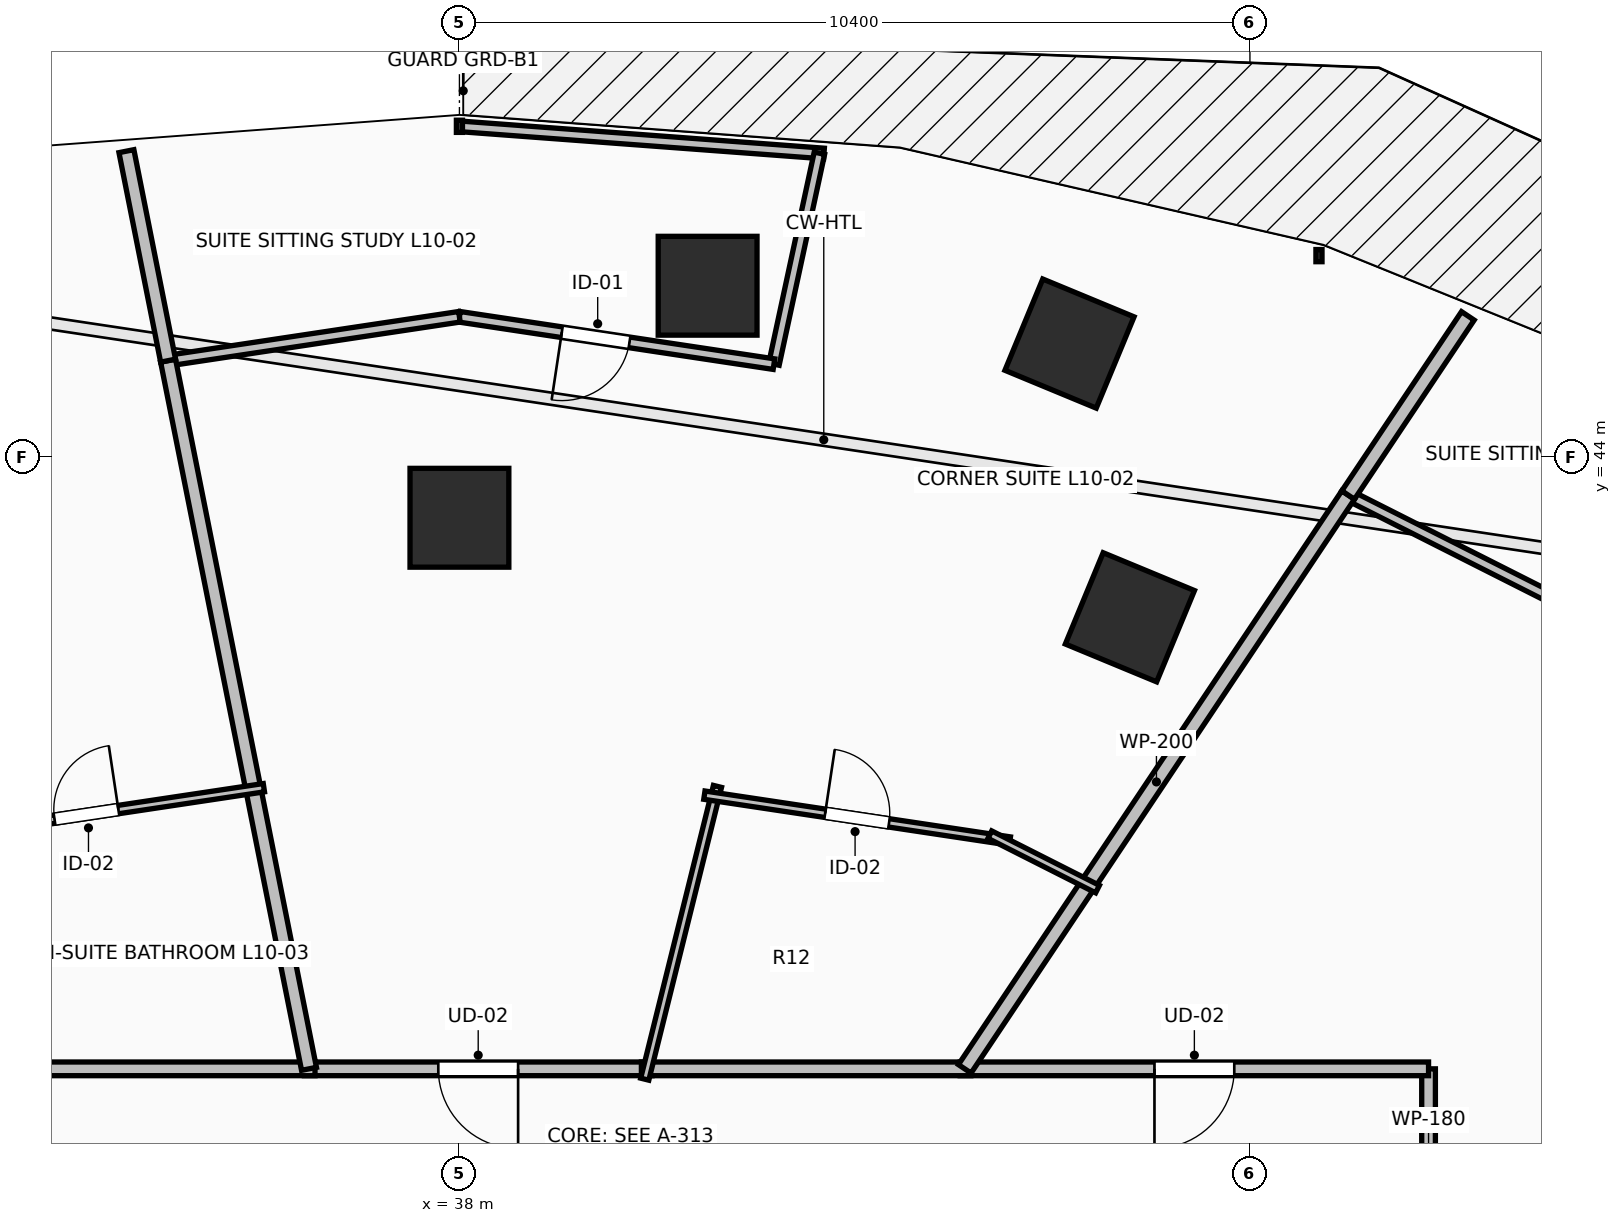
"""IFC4 building model, lengths in metres.
Left out: names, types, materials, properties, quantities, classifications, styles, units other than length and angle.
Written with IfcOpenShell. Run it as: python <this file> out.ifc"""

import sys

from ifc_helpers import new_model, si_unit, direction, frame, frame_2d, origin, origin_2d, place, context, subcontext, project, spatial, rectangle, extrude, element, fill, save


model = new_model("IFC4")
c1 = context("Model", 3, precision=1e-05, world=origin(), true_north=direction((0.0, 1.0)))
c2 = subcontext(c1, "Body", "Model", "MODEL_VIEW")
j1 = project(units=[si_unit("LENGTHUNIT", "METRE"), si_unit("PLANEANGLEUNIT", "RADIAN")], contexts=[c1])
p1 = place(None, origin())
s1 = spatial("IfcSite", under=j1, at=p1, CompositionType="ELEMENT")
p2 = place(p1, origin())
s2 = spatial("IfcBuilding", under=s1, at=p2, CompositionType="ELEMENT")
p3 = place(p2, frame((0.0, 0.0, 41.5)))
s3 = spatial("IfcBuildingStorey", under=s2, at=p3, CompositionType="ELEMENT", Elevation=41.5)
for number, where, z_axis, x_axis in (
    (1, (46.821, 41.891, 0.0), (0.0, 0.0, 1.0), (0.383, 0.924, 0.0)),
    (2, (38.0, 43.2, 0.0), (0.0, 0.0, 1.0), (0.0, 1.0, 0.0)),
    (3, (46.026, 45.492, 0.0), (0.0, 0.0, 1.0), (0.383, 0.924, 0.0)),
    (4, (41.265, 46.252, 0.0), (0.0, 0.0, 1.0), (0.0, 1.0, 0.0)),
):
    element("IfcColumn", number, at=place(p3, frame(where, z_axis=z_axis, x_axis=x_axis)), inside=s3, PredefinedType="COLUMN", context=c2, shape_type="SweptSolid", body=[
        extrude(rectangle(XDim=1.3, YDim=1.3, at=origin_2d()), origin(), (0.0, 0.0, 1.0), 3.5),
    ])
p4 = place(p3, frame((50.75, 33.616, 0.0), z_axis=(0.0, 0.0, 1.0), x_axis=(0.0, 1.0, 0.0)))
e5 = element("IfcWall", 5, at=p4, inside=s3, PredefinedType="PARTITIONING", context=c2, shape_type="SweptSolid", body=[
    extrude(rectangle(XDim=2.334, YDim=0.18, at=frame_2d((1.167, 0.0))), origin(), (0.0, 0.0, 1.0), 2.432),
])
p5 = place(p3, frame((50.75, 35.95, 0.0), z_axis=(0.0, 0.0, 1.0), x_axis=(-1.0, 0.0, 0.0)))
e6 = element("IfcWall", 6, at=p5, inside=s3, PredefinedType="PARTITIONING", context=c2, shape_type="SweptSolid", body=[
    extrude(rectangle(XDim=6.162, YDim=0.18, at=frame_2d((3.081, 0.0))), origin(), (0.0, 0.0, 1.0), 2.432),
])
p6 = place(p5, frame((2.556, 0.0, 0.0)))
e7 = element("IfcOpeningElement", 7, at=p6, cuts=e6, PredefinedType="OPENING", context=c2, shape_type="SweptSolid", body=[
    extrude(rectangle(XDim=1.05, YDim=2.2, at=frame_2d((0.525, 1.1))), frame((0.0, 0.105, 0.0), z_axis=(0.0, -1.0, 0.0), x_axis=(1.0, 0.0, 0.0)), (0.0, 0.0, 1.0), 0.21),
])
p7 = place(p3, frame((40.534, 35.95, 0.0), z_axis=(0.0, 0.0, 1.0), x_axis=(-1.0, 0.0, 0.0)))
e8 = element("IfcWall", 8, at=p7, inside=s3, PredefinedType="PARTITIONING", context=c2, shape_type="SweptSolid", body=[
    extrude(rectangle(XDim=4.574, YDim=0.18, at=frame_2d((2.287, 0.0))), origin(), (0.0, 0.0, 1.0), 3.24),
])
p8 = place(p7, frame((1.762, 0.0, 0.0)))
e9 = element("IfcOpeningElement", 9, at=p8, cuts=e8, PredefinedType="OPENING", context=c2, shape_type="SweptSolid", body=[
    extrude(rectangle(XDim=1.05, YDim=2.2, at=frame_2d((0.525, 1.1))), frame((0.0, 0.105, 0.0), z_axis=(0.0, -1.0, 0.0), x_axis=(1.0, 0.0, 0.0)), (0.0, 0.0, 1.0), 0.21),
])
p9 = place(p3, frame((44.728, 35.95, 0.0), z_axis=(0.0, 0.0, 1.0), x_axis=(-1.0, 0.0, 0.0)))
e10 = element("IfcWall", 10, at=p9, inside=s3, PredefinedType="PARTITIONING", context=c2, shape_type="SweptSolid", body=[
    extrude(rectangle(XDim=4.334, YDim=0.18, at=frame_2d((2.167, 0.0))), origin(), (0.0, 0.0, 1.0), 3.24),
])
p10 = place(p3, frame((36.1, 35.95, 0.0), z_axis=(0.0, 0.0, 1.0), x_axis=(-1.0, 0.0, 0.0)))
e11 = element("IfcWall", 11, at=p10, inside=s3, PredefinedType="PARTITIONING", context=c2, shape_type="SweptSolid", body=[
    extrude(rectangle(XDim=4.17, YDim=0.18, at=frame_2d((2.085, 0.0))), origin(), (0.0, 0.0, 1.0), 3.24),
])
p11 = place(p3, frame((56.554, 40.032, 0.0), z_axis=(0.0, 0.0, 1.0), x_axis=(-0.892545780062, 0.450956794487, 0.0)))
e12 = element("IfcWall", 12, at=p11, inside=s3, PredefinedType="PARTITIONING", context=c2, shape_type="SweptSolid", body=[
    extrude(rectangle(XDim=7.688, YDim=0.14, at=frame_2d((3.844, 0.0))), origin(), (0.0, 0.0, 1.0), 2.432),
])
p12 = place(p11, frame((3.394, 0.0, 0.0)))
e13 = element("IfcOpeningElement", 13, at=p12, cuts=e12, PredefinedType="OPENING", context=c2, shape_type="SweptSolid", body=[
    extrude(rectangle(XDim=0.9, YDim=2.1, at=frame_2d((0.45, 1.05))), frame((0.0, 0.085, 0.0), z_axis=(0.0, -1.0, 0.0), x_axis=(1.0, 0.0, 0.0)), (0.0, 0.0, 1.0), 0.17),
])
p13 = place(p3, frame((49.692, 43.499, 0.0), z_axis=(0.0, 0.0, 1.0), x_axis=(-0.555556259167, -0.831478949163, 0.0)))
e14 = element("IfcWall", 14, at=p13, inside=s3, PredefinedType="PARTITIONING", context=c2, shape_type="SweptSolid", body=[
    extrude(rectangle(XDim=9.079, YDim=0.2, at=frame_2d((4.54, 0.0))), origin(), (0.0, 0.0, 1.0), 2.432),
])
p14 = place(p3, frame((51.267, 45.856, 0.0), z_axis=(0.0, 0.0, 1.0), x_axis=(-0.555653789226, -0.831413775757, 0.0)))
e15 = element("IfcWall", 15, at=p14, inside=s3, PredefinedType="PARTITIONING", context=c2, shape_type="SweptSolid", body=[
    extrude(rectangle(XDim=2.835, YDim=0.2, at=frame_2d((1.417, 0.0))), origin(), (0.0, 0.0, 1.0), 2.624),
])
p15 = place(p3, frame((40.438, 35.814, 0.0), z_axis=(0.0, 0.0, 1.0), x_axis=(0.24101554649, 0.970521254971, 0.0)))
e16 = element("IfcWall", 16, at=p15, inside=s3, PredefinedType="PARTITIONING", context=c2, shape_type="SweptSolid", body=[
    extrude(rectangle(XDim=3.969, YDim=0.11, at=frame_2d((1.984, 0.0))), origin(), (0.0, 0.0, 1.0), 2.972),
])
p16 = place(p3, frame((41.223, 39.551, 0.0), z_axis=(0.0, 0.0, 1.0), x_axis=(0.988911221338, -0.148507899833, 0.0)))
e17 = element("IfcWall", 17, at=p16, inside=s3, PredefinedType="PARTITIONING", context=c2, shape_type="SweptSolid", body=[
    extrude(rectangle(XDim=4.064, YDim=0.11, at=frame_2d((2.032, 0.0))), origin(), (0.0, 0.0, 1.0), 3.24),
])
p17 = place(p16, frame((1.607, 0.0, 0.0)))
e18 = element("IfcOpeningElement", 18, at=p17, cuts=e17, PredefinedType="OPENING", context=c2, shape_type="SweptSolid", body=[
    extrude(rectangle(XDim=0.85, YDim=2.1, at=frame_2d((0.425, 1.05))), frame((0.0, 0.07, 0.0), z_axis=(0.0, -1.0, 0.0), x_axis=(1.0, 0.0, 0.0)), (0.0, 0.0, 1.0), 0.14),
])
p18 = place(p3, frame((44.978, 39.031, 0.0), z_axis=(0.0, 0.0, 1.0), x_axis=(0.892388427115, -0.451268096758, 0.0)))
e19 = element("IfcWall", 19, at=p18, inside=s3, PredefinedType="PARTITIONING", context=c2, shape_type="SweptSolid", body=[
    extrude(rectangle(XDim=1.588, YDim=0.11, at=frame_2d((0.794, 0.0))), origin(), (0.0, 0.0, 1.0), 3.24),
])
p19 = place(p3, frame((42.796, 47.992, 0.0), z_axis=(0.0, 0.0, 1.0), x_axis=(-0.99722311136, 0.074471915311, 0.0)))
e20 = element("IfcWall", 20, at=p19, inside=s3, PredefinedType="PARTITIONING", context=c2, shape_type="SweptSolid", body=[
    extrude(rectangle(XDim=4.809, YDim=0.14, at=frame_2d((2.405, 0.0))), origin(), (0.0, 0.0, 1.0), 3.24),
])
p20 = place(p3, frame((42.736, 47.996, 0.0), z_axis=(0.0, 0.0, 1.0), x_axis=(-0.210697687201, -0.977551269555, 0.0)))
e21 = element("IfcWall", 21, at=p20, inside=s3, PredefinedType="PARTITIONING", context=c2, shape_type="SweptSolid", body=[
    extrude(rectangle(XDim=2.839, YDim=0.14, at=frame_2d((1.419, 0.0))), origin(), (0.0, 0.0, 1.0), 2.624),
])
p21 = place(p3, frame((42.138, 45.221, 0.0), z_axis=(0.0, 0.0, 1.0), x_axis=(-0.988853606593, 0.148891049857, 0.0)))
e22 = element("IfcWall", 22, at=p21, inside=s3, PredefinedType="PARTITIONING", context=c2, shape_type="SweptSolid", body=[
    extrude(rectangle(XDim=4.185, YDim=0.14, at=frame_2d((2.092, 0.0))), origin(), (0.0, 0.0, 1.0), 2.432),
])
p22 = place(p21, frame((1.922, 0.0, 0.0)))
e23 = element("IfcOpeningElement", 23, at=p22, cuts=e22, PredefinedType="OPENING", context=c2, shape_type="SweptSolid", body=[
    extrude(rectangle(XDim=0.9, YDim=2.1, at=frame_2d((0.45, 1.05))), frame((0.0, 0.085, 0.0), z_axis=(0.0, -1.0, 0.0), x_axis=(1.0, 0.0, 0.0)), (0.0, 0.0, 1.0), 0.17),
])
p23 = place(p3, frame((38.0, 45.844, 0.0), z_axis=(0.0, 0.0, 1.0), x_axis=(-0.988862311426, -0.148833225599, 0.0)))
e24 = element("IfcWall", 24, at=p23, inside=s3, PredefinedType="PARTITIONING", context=c2, shape_type="SweptSolid", body=[
    extrude(rectangle(XDim=3.876, YDim=0.14, at=frame_2d((1.938, 0.0))), origin(), (0.0, 0.0, 1.0), 2.624),
])
p24 = place(p3, frame((34.167, 45.267, 0.0), z_axis=(0.0, 0.0, 1.0), x_axis=(0.19516219459, -0.980770981322, 0.0)))
e25 = element("IfcWall", 25, at=p24, inside=s3, PredefinedType="PARTITIONING", context=c2, shape_type="SweptSolid", body=[
    extrude(rectangle(XDim=9.5, YDim=0.2, at=frame_2d((4.75, 0.0))), origin(), (0.0, 0.0, 1.0), 2.432),
])
p25 = place(p3, frame((33.619, 48.023, 0.0), z_axis=(0.0, 0.0, 1.0), x_axis=(0.195063341769, -0.980790646722, 0.0)))
e26 = element("IfcWall", 26, at=p25, inside=s3, PredefinedType="PARTITIONING", context=c2, shape_type="SweptSolid", body=[
    extrude(rectangle(XDim=2.81, YDim=0.2, at=frame_2d((1.405, 0.0))), origin(), (0.0, 0.0, 1.0), 2.624),
])
p26 = place(p3, frame((30.759, 38.947, 0.0), z_axis=(0.0, 0.0, 1.0), x_axis=(0.9889029502, 0.148562966739, 0.0)))
e27 = element("IfcWall", 27, at=p26, inside=s3, PredefinedType="PARTITIONING", context=c2, shape_type="SweptSolid", body=[
    extrude(rectangle(XDim=4.721, YDim=0.11, at=frame_2d((2.361, 0.0))), origin(), (0.0, 0.0, 1.0), 2.432),
])
p27 = place(p26, frame((1.936, 0.0, 0.0)))
e28 = element("IfcOpeningElement", 28, at=p27, cuts=e27, PredefinedType="OPENING", context=c2, shape_type="SweptSolid", body=[
    extrude(rectangle(XDim=0.85, YDim=2.1, at=frame_2d((0.425, 1.05))), frame((0.0, 0.07, 0.0), z_axis=(0.0, -1.0, 0.0), x_axis=(1.0, 0.0, 0.0)), (0.0, 0.0, 1.0), 0.14),
])
p28 = place(p6, origin())
e29 = element("IfcDoor", 29, at=p28, inside=s3, OperationType="SINGLE_SWING_RIGHT", PredefinedType="DOOR", context=c2, shape_type="SweptSolid", body=[
    extrude(rectangle(XDim=1.05, YDim=2.2, at=frame_2d((0.525, 1.1))), frame((0.0, 0.025, 0.0), z_axis=(0.0, -1.0, 0.0), x_axis=(1.0, 0.0, 0.0)), (0.0, 0.0, 1.0), 0.05),
])
fill(e7, e29)
p29 = place(p8, origin())
e30 = element("IfcDoor", 30, at=p29, inside=s3, OperationType="SINGLE_SWING_LEFT", PredefinedType="DOOR", context=c2, shape_type="SweptSolid", body=[
    extrude(rectangle(XDim=1.05, YDim=2.2, at=frame_2d((0.525, 1.1))), frame((0.0, 0.025, 0.0), z_axis=(0.0, -1.0, 0.0), x_axis=(1.0, 0.0, 0.0)), (0.0, 0.0, 1.0), 0.05),
])
fill(e9, e30)
p30 = place(p17, origin())
e31 = element("IfcDoor", 31, at=p30, inside=s3, OperationType="SINGLE_SWING_LEFT", PredefinedType="DOOR", context=c2, shape_type="SweptSolid", body=[
    extrude(rectangle(XDim=0.85, YDim=2.1, at=frame_2d((0.425, 1.05))), frame((0.0, 0.025, 0.0), z_axis=(0.0, -1.0, 0.0), x_axis=(1.0, 0.0, 0.0)), (0.0, 0.0, 1.0), 0.05),
])
fill(e18, e31)
p31 = place(p22, origin())
e32 = element("IfcDoor", 32, at=p31, inside=s3, OperationType="SINGLE_SWING_RIGHT", PredefinedType="DOOR", context=c2, shape_type="SweptSolid", body=[
    extrude(rectangle(XDim=0.9, YDim=2.1, at=frame_2d((0.45, 1.05))), frame((0.0, 0.025, 0.0), z_axis=(0.0, -1.0, 0.0), x_axis=(1.0, 0.0, 0.0)), (0.0, 0.0, 1.0), 0.05),
])
fill(e23, e32)
p32 = place(p27, origin())
e33 = element("IfcDoor", 33, at=p32, inside=s3, OperationType="SINGLE_SWING_RIGHT", PredefinedType="DOOR", context=c2, shape_type="SweptSolid", body=[
    extrude(rectangle(XDim=0.85, YDim=2.1, at=frame_2d((0.425, 1.05))), frame((0.0, 0.025, 0.0), z_axis=(0.0, -1.0, 0.0), x_axis=(1.0, 0.0, 0.0)), (0.0, 0.0, 1.0), 0.05),
])
fill(e28, e33)
save(model, sys.argv[1])
